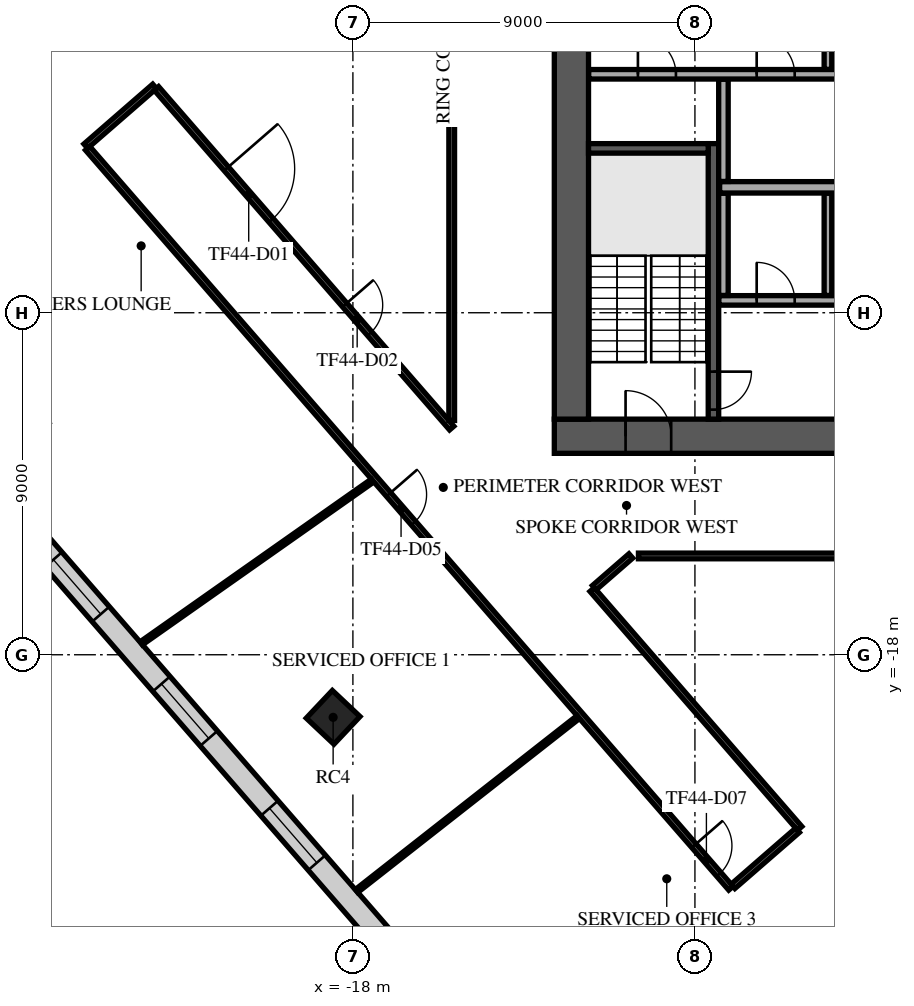
"""IFC4 building model, lengths in metres.
Left out: names, types, materials, properties, quantities, classifications, styles, units other than length and angle.
Written with IfcOpenShell. Run it as: python <this file> out.ifc"""

import sys

from ifc_helpers import new_model, si_unit, direction, frame, frame_2d, origin, origin_2d, place, context, subcontext, project, spatial, rectangle, extrude, element, fill, save


model = new_model("IFC4")
c1 = context("Model", 3, precision=1e-05, world=origin(), true_north=direction((0.0, 1.0)))
c2 = subcontext(c1, "Body", "Model", "MODEL_VIEW")
j1 = project(units=[si_unit("LENGTHUNIT", "METRE"), si_unit("PLANEANGLEUNIT", "RADIAN")], contexts=[c1])
p1 = place(None, origin())
s1 = spatial("IfcSite", under=j1, at=p1, CompositionType="ELEMENT")
p2 = place(p1, origin())
s2 = spatial("IfcBuilding", under=s1, at=p2, CompositionType="ELEMENT")
p3 = place(p2, frame((0.0, 0.0, 189.3)))
s3 = spatial("IfcBuildingStorey", under=s2, at=p3, CompositionType="ELEMENT", Elevation=189.3)
p4 = place(p3, frame((-18.52, -19.647, -0.38), z_axis=(0.0, 0.0, 1.0), x_axis=(0.685916152371, 0.727680583715, 0.0)))
e1 = element("IfcColumn", 1, at=p4, inside=s3, PredefinedType="COLUMN", context=c2, shape_type="SweptSolid", body=[
    extrude(rectangle(XDim=1.0, YDim=1.0, at=origin_2d()), origin(), (0.0, 0.0, 1.0), 4.38),
])
p5 = place(p3, frame((-12.7, -12.25, 0.0), z_axis=(0.0, 0.0, 1.0), x_axis=(1.0, 0.0, 0.0)))
e2 = element("IfcWall", 2, at=p5, inside=s3, PredefinedType="SHEAR", context=c2, shape_type="SweptSolid", body=[
    extrude(rectangle(XDim=25.4, YDim=0.9, at=frame_2d((12.7, 0.0))), origin(), (0.0, 0.0, 1.0), 3.62),
])
p6 = place(p5, frame((7.6, 0.0, 0.0)))
e3 = element("IfcOpeningElement", 3, at=p6, cuts=e2, PredefinedType="OPENING", context=c2, shape_type="SweptSolid", body=[
    extrude(rectangle(XDim=2.0, YDim=2.1, at=frame_2d((1.0, 1.05))), frame((0.0, 0.46, 0.0), z_axis=(0.0, -1.0, 0.0), x_axis=(1.0, 0.0, 0.0)), (0.0, 0.0, 1.0), 0.92),
])
p7 = place(p5, frame((17.725, 0.0, 0.0)))
e4 = element("IfcOpeningElement", 4, at=p7, cuts=e2, PredefinedType="OPENING", context=c2, shape_type="SweptSolid", body=[
    extrude(rectangle(XDim=1.2, YDim=2.1, at=frame_2d((0.6, 1.05))), frame((0.0, 0.46, 0.0), z_axis=(0.0, -1.0, 0.0), x_axis=(1.0, 0.0, 0.0)), (0.0, 0.0, 1.0), 0.92),
])
p8 = place(p5, frame((1.875, 0.0, 0.0)))
e5 = element("IfcOpeningElement", 5, at=p8, cuts=e2, PredefinedType="OPENING", context=c2, shape_type="SweptSolid", body=[
    extrude(rectangle(XDim=1.2, YDim=2.1, at=frame_2d((0.6, 1.05))), frame((0.0, 0.46, 0.0), z_axis=(0.0, -1.0, 0.0), x_axis=(1.0, 0.0, 0.0)), (0.0, 0.0, 1.0), 0.92),
])
p9 = place(p5, frame((22.325, 0.0, 0.0)))
e6 = element("IfcOpeningElement", 6, at=p9, cuts=e2, PredefinedType="OPENING", context=c2, shape_type="SweptSolid", body=[
    extrude(rectangle(XDim=1.2, YDim=2.1, at=frame_2d((0.6, 1.05))), frame((0.0, 0.46, 0.0), z_axis=(0.0, -1.0, 0.0), x_axis=(1.0, 0.0, 0.0)), (0.0, 0.0, 1.0), 0.92),
])
p10 = place(p3, frame((-12.25, -11.8, 0.0), z_axis=(0.0, 0.0, 1.0), x_axis=(0.0, 1.0, 0.0)))
e7 = element("IfcWall", 7, at=p10, inside=s3, PredefinedType="SHEAR", context=c2, shape_type="SweptSolid", body=[
    extrude(rectangle(XDim=23.6, YDim=0.9, at=frame_2d((11.8, 0.0))), origin(), (0.0, 0.0, 1.0), 3.62),
])
p11 = place(p10, frame((10.6, 0.0, 0.0)))
e8 = element("IfcOpeningElement", 8, at=p11, cuts=e7, PredefinedType="OPENING", context=c2, shape_type="SweptSolid", body=[
    extrude(rectangle(XDim=2.4, YDim=2.4, at=frame_2d((1.2, 1.2))), frame((0.0, 0.46, 0.0), z_axis=(0.0, -1.0, 0.0), x_axis=(1.0, 0.0, 0.0)), (0.0, 0.0, 1.0), 0.92),
])
p12 = place(p3, frame((-8.512, -4.55, 0.0), z_axis=(0.0, 0.0, 1.0), x_axis=(0.0, -1.0, 0.0)))
e9 = element("IfcWall", 9, at=p12, inside=s3, PredefinedType="SOLIDWALL", context=c2, shape_type="SweptSolid", body=[
    extrude(rectangle(XDim=7.25, YDim=0.275, at=frame_2d((3.625, 0.0))), origin(), (0.0, 0.0, 1.0), 3.62),
])
p13 = place(p12, frame((6.0, 0.0, 0.0)))
e10 = element("IfcOpeningElement", 10, at=p13, cuts=e9, PredefinedType="OPENING", context=c2, shape_type="SweptSolid", body=[
    extrude(rectangle(XDim=1.0, YDim=2.1, at=frame_2d((0.5, 1.05))), frame((0.0, 0.147, 0.0), z_axis=(0.0, -1.0, 0.0), x_axis=(1.0, 0.0, 0.0)), (0.0, 0.0, 1.0), 0.295),
])
p14 = place(p3, frame((-8.65, -4.675, 0.0), z_axis=(0.0, 0.0, 1.0), x_axis=(-1.0, 0.0, 0.0)))
e11 = element("IfcWall", 11, at=p14, inside=s3, PredefinedType="SOLIDWALL", context=c2, shape_type="SweptSolid", body=[
    extrude(rectangle(XDim=3.15, YDim=0.25, at=frame_2d((1.575, 0.0))), origin(), (0.0, 0.0, 1.0), 3.62),
])
p15 = place(p3, frame((-8.37, -8.675, 0.0), z_axis=(0.0, 0.0, 1.0), x_axis=(1.0, 0.0, 0.0)))
e12 = element("IfcWall", 12, at=p15, inside=s3, PredefinedType="PARTITIONING", context=c2, shape_type="SweptSolid", body=[
    extrude(rectangle(XDim=5.49, YDim=0.25, at=frame_2d((2.745, 0.0))), origin(), (0.0, 0.0, 1.0), 3.62),
])
p16 = place(p15, frame((0.995, 0.0, 0.0)))
e13 = element("IfcOpeningElement", 13, at=p16, cuts=e12, PredefinedType="OPENING", context=c2, shape_type="SweptSolid", body=[
    extrude(rectangle(XDim=1.0, YDim=2.1, at=frame_2d((0.5, 1.05))), frame((0.0, 0.135, 0.0), z_axis=(0.0, -1.0, 0.0), x_axis=(1.0, 0.0, 0.0)), (0.0, 0.0, 1.0), 0.27),
])
p17 = place(p15, frame((3.745, 0.0, 0.0)))
e14 = element("IfcOpeningElement", 14, at=p17, cuts=e12, PredefinedType="OPENING", context=c2, shape_type="SweptSolid", body=[
    extrude(rectangle(XDim=1.0, YDim=2.1, at=frame_2d((0.5, 1.05))), frame((0.0, 0.135, 0.0), z_axis=(0.0, -1.0, 0.0), x_axis=(1.0, 0.0, 0.0)), (0.0, 0.0, 1.0), 0.27),
])
p18 = place(p3, frame((-8.25, -8.545, 0.0), z_axis=(0.0, 0.0, 1.0), x_axis=(0.0, 1.0, 0.0)))
e15 = element("IfcWall", 15, at=p18, inside=s3, PredefinedType="PARTITIONING", context=c2, shape_type="SweptSolid", body=[
    extrude(rectangle(XDim=2.69, YDim=0.25, at=frame_2d((1.345, 0.0))), origin(), (0.0, 0.0, 1.0), 3.62),
])
p19 = place(p3, frame((-5.5, -8.545, 0.0), z_axis=(0.0, 0.0, 1.0), x_axis=(0.0, 1.0, 0.0)))
e16 = element("IfcWall", 16, at=p19, inside=s3, PredefinedType="PARTITIONING", context=c2, shape_type="SweptSolid", body=[
    extrude(rectangle(XDim=2.69, YDim=0.2, at=frame_2d((1.345, 0.0))), origin(), (0.0, 0.0, 1.0), 3.62),
])
p20 = place(p3, frame((-8.35, -5.7, 0.0), z_axis=(0.0, 0.0, 1.0), x_axis=(1.0, 0.0, 0.0)))
e17 = element("IfcWall", 17, at=p20, inside=s3, PredefinedType="PARTITIONING", context=c2, shape_type="SweptSolid", body=[
    extrude(rectangle(XDim=5.47, YDim=0.3, at=frame_2d((2.735, 0.0))), origin(), (0.0, 0.0, 1.0), 3.62),
])
p21 = place(p3, frame((-8.25, -5.545, 0.0), z_axis=(0.0, 0.0, 1.0), x_axis=(0.0, 1.0, 0.0)))
e18 = element("IfcWall", 18, at=p21, inside=s3, PredefinedType="PARTITIONING", context=c2, shape_type="SweptSolid", body=[
    extrude(rectangle(XDim=2.69, YDim=0.25, at=frame_2d((1.345, 0.0))), origin(), (0.0, 0.0, 1.0), 3.62),
])
p22 = place(p3, frame((-11.795, -2.725, 0.0), z_axis=(0.0, 0.0, 1.0), x_axis=(1.0, 0.0, 0.0)))
e19 = element("IfcWall", 19, at=p22, inside=s3, PredefinedType="PARTITIONING", context=c2, shape_type="SweptSolid", body=[
    extrude(rectangle(XDim=8.915, YDim=0.25, at=frame_2d((4.458, 0.0))), origin(), (0.0, 0.0, 1.0), 3.62),
])
p23 = place(p22, frame((1.295, 0.0, 0.0)))
e20 = element("IfcOpeningElement", 20, at=p23, cuts=e19, PredefinedType="OPENING", context=c2, shape_type="SweptSolid", body=[
    extrude(rectangle(XDim=1.0, YDim=2.1, at=frame_2d((0.5, 1.05))), frame((0.0, 0.135, 0.0), z_axis=(0.0, -1.0, 0.0), x_axis=(1.0, 0.0, 0.0)), (0.0, 0.0, 1.0), 0.27),
])
p24 = place(p22, frame((4.42, 0.0, 0.0)))
e21 = element("IfcOpeningElement", 21, at=p24, cuts=e19, PredefinedType="OPENING", context=c2, shape_type="SweptSolid", body=[
    extrude(rectangle(XDim=1.0, YDim=2.1, at=frame_2d((0.5, 1.05))), frame((0.0, 0.135, 0.0), z_axis=(0.0, -1.0, 0.0), x_axis=(1.0, 0.0, 0.0)), (0.0, 0.0, 1.0), 0.27),
])
p25 = place(p3, frame((-5.5, -2.595, 0.0), z_axis=(0.0, 0.0, 1.0), x_axis=(0.0, 1.0, 0.0)))
e22 = element("IfcWall", 22, at=p25, inside=s3, PredefinedType="PARTITIONING", context=c2, shape_type="SweptSolid", body=[
    extrude(rectangle(XDim=5.19, YDim=0.2, at=frame_2d((2.595, 0.0))), origin(), (0.0, 0.0, 1.0), 3.62),
])
p26 = place(p25, frame((1.395, 0.0, 0.0)))
e23 = element("IfcOpeningElement", 23, at=p26, cuts=e22, PredefinedType="OPENING", context=c2, shape_type="SweptSolid", body=[
    extrude(rectangle(XDim=2.4, YDim=2.4, at=frame_2d((1.2, 1.2))), frame((0.0, 0.11, 0.0), z_axis=(0.0, -1.0, 0.0), x_axis=(1.0, 0.0, 0.0)), (0.0, 0.0, 1.0), 0.22),
])
p27 = place(p3, frame((-35.208, -4.768, 0.0), z_axis=(0.0, 0.0, 1.0), x_axis=(0.656058749455, -0.754709823219, 0.0)))
e24 = element("IfcWall", 24, at=p27, inside=s3, PredefinedType="STANDARD", context=c2, shape_type="SweptSolid", body=[
    extrude(rectangle(XDim=39.0, YDim=0.6, at=frame_2d((19.5, 0.0))), origin(), (0.0, 0.0, 1.0), 3.62),
])
p28 = place(p27, frame((1.217, 0.0, 0.9)))
e25 = element("IfcOpeningElement", 25, at=p28, cuts=e24, PredefinedType="OPENING", context=c2, shape_type="SweptSolid", body=[
    extrude(rectangle(XDim=1.9, YDim=2.1, at=frame_2d((0.95, 1.05))), frame((0.0, 0.31, 0.0), z_axis=(0.0, -1.0, 0.0), x_axis=(1.0, 0.0, 0.0)), (0.0, 0.0, 1.0), 0.62),
])
p29 = place(p27, frame((5.55, 0.0, 0.9)))
e26 = element("IfcOpeningElement", 26, at=p29, cuts=e24, PredefinedType="OPENING", context=c2, shape_type="SweptSolid", body=[
    extrude(rectangle(XDim=1.9, YDim=2.1, at=frame_2d((0.95, 1.05))), frame((0.0, 0.31, 0.0), z_axis=(0.0, -1.0, 0.0), x_axis=(1.0, 0.0, 0.0)), (0.0, 0.0, 1.0), 0.62),
])
p30 = place(p27, frame((9.883, 0.0, 0.9)))
e27 = element("IfcOpeningElement", 27, at=p30, cuts=e24, PredefinedType="OPENING", context=c2, shape_type="SweptSolid", body=[
    extrude(rectangle(XDim=1.9, YDim=2.1, at=frame_2d((0.95, 1.05))), frame((0.0, 0.31, 0.0), z_axis=(0.0, -1.0, 0.0), x_axis=(1.0, 0.0, 0.0)), (0.0, 0.0, 1.0), 0.62),
])
p31 = place(p27, frame((14.217, 0.0, 0.9)))
e28 = element("IfcOpeningElement", 28, at=p31, cuts=e24, PredefinedType="OPENING", context=c2, shape_type="SweptSolid", body=[
    extrude(rectangle(XDim=1.9, YDim=2.1, at=frame_2d((0.95, 1.05))), frame((0.0, 0.31, 0.0), z_axis=(0.0, -1.0, 0.0), x_axis=(1.0, 0.0, 0.0)), (0.0, 0.0, 1.0), 0.62),
])
p32 = place(p27, frame((18.55, 0.0, 0.9)))
e29 = element("IfcOpeningElement", 29, at=p32, cuts=e24, PredefinedType="OPENING", context=c2, shape_type="SweptSolid", body=[
    extrude(rectangle(XDim=1.9, YDim=2.1, at=frame_2d((0.95, 1.05))), frame((0.0, 0.31, 0.0), z_axis=(0.0, -1.0, 0.0), x_axis=(1.0, 0.0, 0.0)), (0.0, 0.0, 1.0), 0.62),
])
p33 = place(p27, frame((22.883, 0.0, 0.9)))
e30 = element("IfcOpeningElement", 30, at=p33, cuts=e24, PredefinedType="OPENING", context=c2, shape_type="SweptSolid", body=[
    extrude(rectangle(XDim=1.9, YDim=2.1, at=frame_2d((0.95, 1.05))), frame((0.0, 0.31, 0.0), z_axis=(0.0, -1.0, 0.0), x_axis=(1.0, 0.0, 0.0)), (0.0, 0.0, 1.0), 0.62),
])
p34 = place(p27, frame((27.217, 0.0, 0.9)))
e31 = element("IfcOpeningElement", 31, at=p34, cuts=e24, PredefinedType="OPENING", context=c2, shape_type="SweptSolid", body=[
    extrude(rectangle(XDim=1.9, YDim=2.1, at=frame_2d((0.95, 1.05))), frame((0.0, 0.31, 0.0), z_axis=(0.0, -1.0, 0.0), x_axis=(1.0, 0.0, 0.0)), (0.0, 0.0, 1.0), 0.62),
])
p35 = place(p27, frame((31.55, 0.0, 0.9)))
e32 = element("IfcOpeningElement", 32, at=p35, cuts=e24, PredefinedType="OPENING", context=c2, shape_type="SweptSolid", body=[
    extrude(rectangle(XDim=1.9, YDim=2.1, at=frame_2d((0.95, 1.05))), frame((0.0, 0.31, 0.0), z_axis=(0.0, -1.0, 0.0), x_axis=(1.0, 0.0, 0.0)), (0.0, 0.0, 1.0), 0.62),
])
p36 = place(p27, frame((35.883, 0.0, 0.9)))
e33 = element("IfcOpeningElement", 33, at=p36, cuts=e24, PredefinedType="OPENING", context=c2, shape_type="SweptSolid", body=[
    extrude(rectangle(XDim=1.9, YDim=2.1, at=frame_2d((0.95, 1.05))), frame((0.0, 0.31, 0.0), z_axis=(0.0, -1.0, 0.0), x_axis=(1.0, 0.0, 0.0)), (0.0, 0.0, 1.0), 0.62),
])
p37 = place(p3, frame((-25.029, -4.616, 0.0), z_axis=(0.0, 0.0, 1.0), x_axis=(0.75457705231, 0.656211453822, 0.0)))
e34 = element("IfcWall", 34, at=p37, inside=s3, PredefinedType="PARTITIONING", context=c2, shape_type="SweptSolid", body=[
    extrude(rectangle(XDim=2.4, YDim=0.15, at=frame_2d((1.2, 0.0))), origin(), (0.0, 0.0, 1.0), 3.17),
])
p38 = place(p3, frame((-24.98, -4.673, 0.0), z_axis=(0.0, 0.0, 1.0), x_axis=(0.656048444225, -0.754718781289, 0.0)))
e35 = element("IfcWall", 35, at=p38, inside=s3, PredefinedType="PARTITIONING", context=c2, shape_type="SweptSolid", body=[
    extrude(rectangle(XDim=25.8, YDim=0.15, at=frame_2d((12.9, 0.0))), origin(), (0.0, 0.0, 1.0), 3.17),
])
p39 = place(p38, frame((12.071, 0.0, 0.0)))
e36 = element("IfcOpeningElement", 36, at=p39, cuts=e35, PredefinedType="OPENING", context=c2, shape_type="SweptSolid", body=[
    extrude(rectangle(XDim=1.0, YDim=2.1, at=frame_2d((0.5, 1.05))), frame((0.0, 0.085, 0.0), z_axis=(0.0, -1.0, 0.0), x_axis=(1.0, 0.0, 0.0)), (0.0, 0.0, 1.0), 0.17),
])
p40 = place(p38, frame((24.318, 0.0, 0.0)))
e37 = element("IfcOpeningElement", 37, at=p40, cuts=e35, PredefinedType="OPENING", context=c2, shape_type="SweptSolid", body=[
    extrude(rectangle(XDim=1.0, YDim=2.1, at=frame_2d((0.5, 1.05))), frame((0.0, 0.085, 0.0), z_axis=(0.0, -1.0, 0.0), x_axis=(1.0, 0.0, 0.0)), (0.0, 0.0, 1.0), 0.17),
])
p41 = place(p3, frame((-23.169, -3.098, 0.0), z_axis=(0.0, 0.0, 1.0), x_axis=(0.656047525283, -0.754719580089, 0.0)))
e38 = element("IfcWall", 38, at=p41, inside=s3, PredefinedType="PARTITIONING", context=c2, shape_type="SweptSolid", body=[
    extrude(rectangle(XDim=11.842, YDim=0.15, at=frame_2d((5.921, 0.0))), origin(), (0.0, 0.0, 1.0), 3.17),
])
p42 = place(p41, frame((2.8, 0.0, 0.0)))
e39 = element("IfcOpeningElement", 39, at=p42, cuts=e38, PredefinedType="OPENING", context=c2, shape_type="SweptSolid", body=[
    extrude(rectangle(XDim=1.8, YDim=2.1, at=frame_2d((0.9, 1.05))), frame((0.0, 0.085, 0.0), z_axis=(0.0, -1.0, 0.0), x_axis=(1.0, 0.0, 0.0)), (0.0, 0.0, 1.0), 0.17),
])
p43 = place(p41, frame((7.55, 0.0, 0.0)))
e40 = element("IfcOpeningElement", 40, at=p43, cuts=e38, PredefinedType="OPENING", context=c2, shape_type="SweptSolid", body=[
    extrude(rectangle(XDim=1.0, YDim=2.1, at=frame_2d((0.5, 1.05))), frame((0.0, 0.085, 0.0), z_axis=(0.0, -1.0, 0.0), x_axis=(1.0, 0.0, 0.0)), (0.0, 0.0, 1.0), 0.17),
])
p44 = place(p3, frame((-15.4, -11.834, 0.0), z_axis=(0.0, 0.0, 1.0), x_axis=(0.0, 1.0, 0.0)))
e41 = element("IfcWall", 41, at=p44, inside=s3, PredefinedType="PARTITIONING", context=c2, shape_type="SweptSolid", body=[
    extrude(rectangle(XDim=20.666, YDim=0.15, at=frame_2d((10.333, 0.0))), origin(), (0.0, 0.0, 1.0), 3.17),
])
p45 = place(p3, frame((-11.705, -16.285, 0.0), z_axis=(0.0, 0.0, 1.0), x_axis=(0.656018266208, -0.754745012837, 0.0)))
e42 = element("IfcWall", 42, at=p45, inside=s3, PredefinedType="PARTITIONING", context=c2, shape_type="SweptSolid", body=[
    extrude(rectangle(XDim=8.326, YDim=0.15, at=frame_2d((4.163, 0.0))), origin(), (0.0, 0.0, 1.0), 3.17),
])
p46 = place(p3, frame((-11.648, -16.236, 0.0), z_axis=(0.0, 0.0, 1.0), x_axis=(0.754638525281, 0.656140759412, 0.0)))
e43 = element("IfcWall", 43, at=p46, inside=s3, PredefinedType="PARTITIONING", context=c2, shape_type="SweptSolid", body=[
    extrude(rectangle(XDim=1.274, YDim=0.15, at=frame_2d((0.637, 0.0))), origin(), (0.0, 0.0, 1.0), 3.17),
])
p47 = place(p3, frame((-10.486, -15.4, 0.0), z_axis=(0.0, 0.0, 1.0), x_axis=(1.0, 0.0, 0.0)))
e44 = element("IfcWall", 44, at=p47, inside=s3, PredefinedType="PARTITIONING", context=c2, shape_type="SweptSolid", body=[
    extrude(rectangle(XDim=17.763, YDim=0.15, at=frame_2d((8.882, 0.0))), origin(), (0.0, 0.0, 1.0), 3.17),
])
p48 = place(p47, frame((14.154, 0.0, 0.0)))
e45 = element("IfcOpeningElement", 45, at=p48, cuts=e44, PredefinedType="OPENING", context=c2, shape_type="SweptSolid", body=[
    extrude(rectangle(XDim=1.0, YDim=2.1, at=frame_2d((0.5, 1.05))), frame((0.0, 0.085, 0.0), z_axis=(0.0, -1.0, 0.0), x_axis=(1.0, 0.0, 0.0)), (0.0, 0.0, 1.0), 0.17),
])
p49 = place(p3, frame((-7.997, -24.095, 0.0), z_axis=(0.0, 0.0, 1.0), x_axis=(0.754549456123, 0.656243185308, 0.0)))
e46 = element("IfcWall", 46, at=p49, inside=s3, PredefinedType="PARTITIONING", context=c2, shape_type="SweptSolid", body=[
    extrude(rectangle(XDim=2.25, YDim=0.15, at=frame_2d((1.125, 0.0))), origin(), (0.0, 0.0, 1.0), 3.17),
])
p50 = place(p3, frame((-23.568, -17.698, 0.0), z_axis=(0.0, 0.0, 1.0), x_axis=(0.817824726915, 0.575467389212, 0.0)))
e47 = element("IfcWall", 47, at=p50, inside=s3, PredefinedType="PARTITIONING", context=c2, shape_type="SweptSolid", body=[
    extrude(rectangle(XDim=7.438, YDim=0.1, at=frame_2d((3.719, 0.0))), origin(), (0.0, 0.0, 1.0), 3.17),
])
p51 = place(p3, frame((-17.903, -24.215, 0.0), z_axis=(0.0, 0.0, 1.0), x_axis=(0.786835853262, 0.617162328744, 0.0)))
e48 = element("IfcWall", 48, at=p51, inside=s3, PredefinedType="PARTITIONING", context=c2, shape_type="SweptSolid", body=[
    extrude(rectangle(XDim=7.412, YDim=0.1, at=frame_2d((3.706, 0.0))), origin(), (0.0, 0.0, 1.0), 3.17),
])
p52 = place(p3, frame((-5.674, -30.833, 0.0), z_axis=(0.0, 0.0, 1.0), x_axis=(0.114957483757, 0.993370412751, 0.0)))
e49 = element("IfcWall", 49, at=p52, inside=s3, PredefinedType="PARTITIONING", context=c2, shape_type="SweptSolid", body=[
    extrude(rectangle(XDim=15.455, YDim=0.1, at=frame_2d((7.727, 0.0))), origin(), (0.0, 0.0, 1.0), 3.62),
])
p53 = place(p8, origin())
e50 = element("IfcDoor", 50, at=p53, inside=s3, OperationType="SINGLE_SWING_LEFT", PredefinedType="DOOR", context=c2, shape_type="SweptSolid", body=[
    extrude(rectangle(XDim=1.2, YDim=2.1, at=frame_2d((0.6, 1.05))), frame((0.0, 0.025, 0.0), z_axis=(0.0, -1.0, 0.0), x_axis=(1.0, 0.0, 0.0)), (0.0, 0.0, 1.0), 0.05),
])
fill(e5, e50)
p54 = place(p13, origin())
e51 = element("IfcDoor", 51, at=p54, inside=s3, OperationType="SINGLE_SWING_LEFT", PredefinedType="DOOR", context=c2, shape_type="SweptSolid", body=[
    extrude(rectangle(XDim=1.0, YDim=2.1, at=frame_2d((0.5, 1.05))), frame((0.0, 0.025, 0.0), z_axis=(0.0, -1.0, 0.0), x_axis=(1.0, 0.0, 0.0)), (0.0, 0.0, 1.0), 0.05),
])
fill(e10, e51)
p55 = place(p16, origin())
e52 = element("IfcDoor", 52, at=p55, inside=s3, OperationType="SINGLE_SWING_LEFT", PredefinedType="DOOR", context=c2, shape_type="SweptSolid", body=[
    extrude(rectangle(XDim=1.0, YDim=2.1, at=frame_2d((0.5, 1.05))), frame((0.0, 0.025, 0.0), z_axis=(0.0, -1.0, 0.0), x_axis=(1.0, 0.0, 0.0)), (0.0, 0.0, 1.0), 0.05),
])
fill(e13, e52)
p56 = place(p23, origin())
e53 = element("IfcDoor", 53, at=p56, inside=s3, OperationType="SINGLE_SWING_LEFT", PredefinedType="DOOR", context=c2, shape_type="SweptSolid", body=[
    extrude(rectangle(XDim=1.0, YDim=2.1, at=frame_2d((0.5, 1.05))), frame((0.0, 0.025, 0.0), z_axis=(0.0, -1.0, 0.0), x_axis=(1.0, 0.0, 0.0)), (0.0, 0.0, 1.0), 0.05),
])
fill(e20, e53)
p57 = place(p24, origin())
e54 = element("IfcDoor", 54, at=p57, inside=s3, OperationType="SINGLE_SWING_LEFT", PredefinedType="DOOR", context=c2, shape_type="SweptSolid", body=[
    extrude(rectangle(XDim=1.0, YDim=2.1, at=frame_2d((0.5, 1.05))), frame((0.0, 0.025, 0.0), z_axis=(0.0, -1.0, 0.0), x_axis=(1.0, 0.0, 0.0)), (0.0, 0.0, 1.0), 0.05),
])
fill(e21, e54)
p58 = place(p31, origin())
e55 = element("IfcWindow", 55, at=p58, inside=s3, PartitioningType="SINGLE_PANEL", PredefinedType="WINDOW", context=c2, shape_type="SweptSolid", body=[
    extrude(rectangle(XDim=1.9, YDim=2.1, at=frame_2d((0.95, 1.05))), frame((0.0, 0.03, 0.0), z_axis=(0.0, -1.0, 0.0), x_axis=(1.0, 0.0, 0.0)), (0.0, 0.0, 1.0), 0.06),
])
fill(e28, e55)
p59 = place(p32, origin())
e56 = element("IfcWindow", 56, at=p59, inside=s3, PartitioningType="SINGLE_PANEL", PredefinedType="WINDOW", context=c2, shape_type="SweptSolid", body=[
    extrude(rectangle(XDim=1.9, YDim=2.1, at=frame_2d((0.95, 1.05))), frame((0.0, 0.03, 0.0), z_axis=(0.0, -1.0, 0.0), x_axis=(1.0, 0.0, 0.0)), (0.0, 0.0, 1.0), 0.06),
])
fill(e29, e56)
p60 = place(p33, origin())
e57 = element("IfcWindow", 57, at=p60, inside=s3, PartitioningType="SINGLE_PANEL", PredefinedType="WINDOW", context=c2, shape_type="SweptSolid", body=[
    extrude(rectangle(XDim=1.9, YDim=2.1, at=frame_2d((0.95, 1.05))), frame((0.0, 0.03, 0.0), z_axis=(0.0, -1.0, 0.0), x_axis=(1.0, 0.0, 0.0)), (0.0, 0.0, 1.0), 0.06),
])
fill(e30, e57)
p61 = place(p42, origin())
e58 = element("IfcDoor", 58, at=p61, inside=s3, OperationType="DOUBLE_DOOR_SINGLE_SWING", PredefinedType="DOOR", context=c2, shape_type="SweptSolid", body=[
    extrude(rectangle(XDim=1.8, YDim=2.1, at=frame_2d((0.9, 1.05))), frame((0.0, 0.025, 0.0), z_axis=(0.0, -1.0, 0.0), x_axis=(1.0, 0.0, 0.0)), (0.0, 0.0, 1.0), 0.05),
])
fill(e39, e58)
p62 = place(p43, origin())
e59 = element("IfcDoor", 59, at=p62, inside=s3, OperationType="SINGLE_SWING_RIGHT", PredefinedType="DOOR", context=c2, shape_type="SweptSolid", body=[
    extrude(rectangle(XDim=1.0, YDim=2.1, at=frame_2d((0.5, 1.05))), frame((0.0, 0.025, 0.0), z_axis=(0.0, -1.0, 0.0), x_axis=(1.0, 0.0, 0.0)), (0.0, 0.0, 1.0), 0.05),
])
fill(e40, e59)
p63 = place(p39, frame((1.0, 0.0, 0.0), z_axis=(0.0, 0.0, 1.0), x_axis=(-1.0, 0.0, 0.0)))
e60 = element("IfcDoor", 60, at=p63, inside=s3, OperationType="SINGLE_SWING_LEFT", PredefinedType="DOOR", context=c2, shape_type="SweptSolid", body=[
    extrude(rectangle(XDim=1.0, YDim=2.1, at=frame_2d((0.5, 1.05))), frame((0.0, 0.025, 0.0), z_axis=(0.0, -1.0, 0.0), x_axis=(1.0, 0.0, 0.0)), (0.0, 0.0, 1.0), 0.05),
])
fill(e36, e60)
p64 = place(p40, frame((1.0, 0.0, 0.0), z_axis=(0.0, 0.0, 1.0), x_axis=(-1.0, 0.0, 0.0)))
e61 = element("IfcDoor", 61, at=p64, inside=s3, OperationType="SINGLE_SWING_LEFT", PredefinedType="DOOR", context=c2, shape_type="SweptSolid", body=[
    extrude(rectangle(XDim=1.0, YDim=2.1, at=frame_2d((0.5, 1.05))), frame((0.0, 0.025, 0.0), z_axis=(0.0, -1.0, 0.0), x_axis=(1.0, 0.0, 0.0)), (0.0, 0.0, 1.0), 0.05),
])
fill(e37, e61)
save(model, sys.argv[1])
